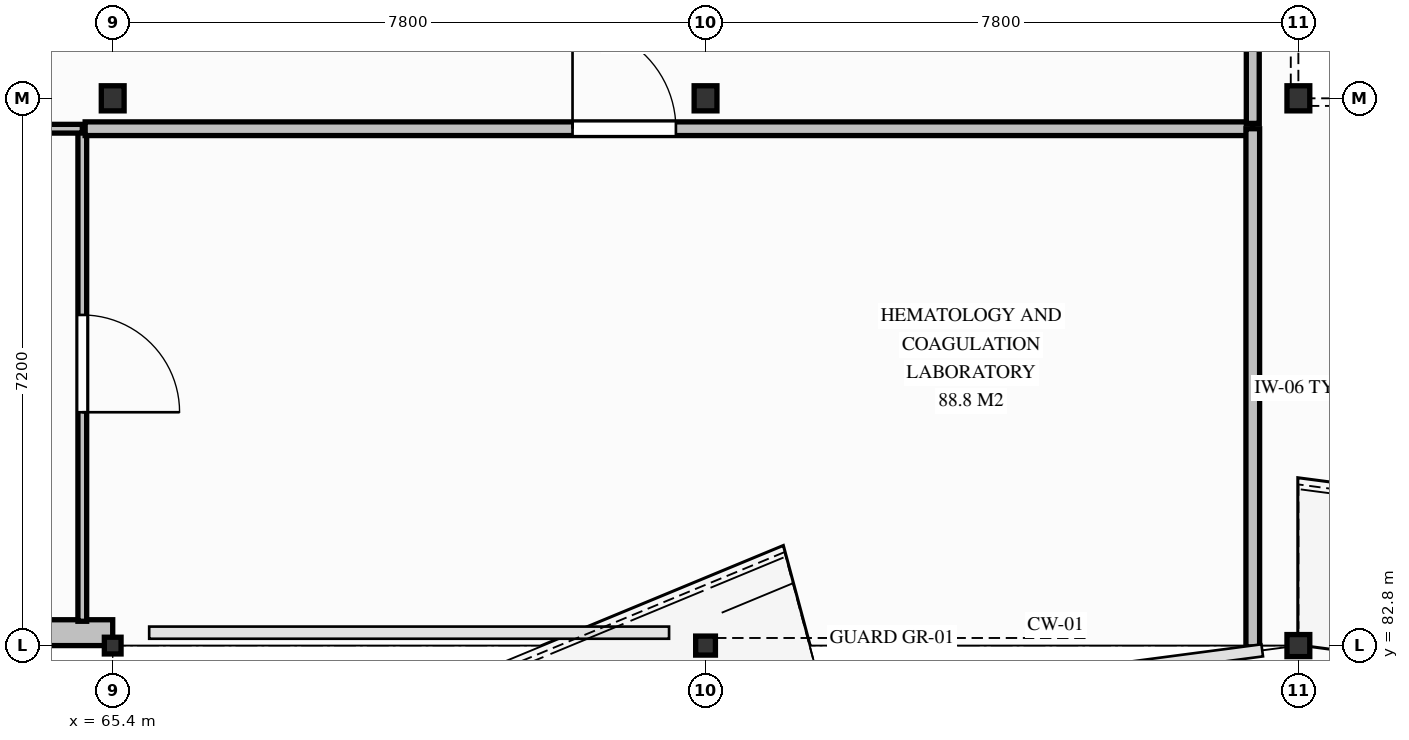
"""IFC4 building model, lengths in metres.
Left out: names, types, materials, properties, quantities, classifications, styles, units other than length and angle.
Written with IfcOpenShell. Run it as: python <this file> out.ifc"""

import sys

from ifc_helpers import new_model, si_unit, direction, frame, frame_2d, origin, origin_2d, place, context, subcontext, project, spatial, rectangle, hollow_rectangle, i_section, extrude, element, fill, save


model = new_model("IFC4")
c1 = context("Model", 3, precision=1e-05, world=origin(), true_north=direction((0.0, 1.0)))
c2 = subcontext(c1, "Body", "Model", "MODEL_VIEW")
j1 = project(units=[si_unit("LENGTHUNIT", "METRE"), si_unit("PLANEANGLEUNIT", "RADIAN")], contexts=[c1])
p1 = place(None, origin())
s1 = spatial("IfcSite", under=j1, at=p1, CompositionType="ELEMENT")
p2 = place(p1, origin())
s2 = spatial("IfcBuilding", under=s1, at=p2, CompositionType="ELEMENT")
p3 = place(p2, frame((0.0, 0.0, 13.2)))
s3 = spatial("IfcBuildingStorey", under=s2, at=p3, CompositionType="ELEMENT", Elevation=13.2)
p4 = place(p3, frame((65.4, 82.8, 0.0), z_axis=(0.0, 0.0, 1.0), x_axis=(1.0, 0.0, 0.0)))
e1 = element("IfcColumn", 1, at=p4, inside=s3, PredefinedType="COLUMN", context=c2, shape_type="SweptSolid", body=[
    extrude(hollow_rectangle(XDim=0.22, YDim=0.22, WallThickness=0.012, InnerFilletRadius=0.019, OuterFilletRadius=0.031, at=origin_2d()), origin(), (0.0, 0.0, 1.0), 4.05),
])
p5 = place(p3, frame((65.4, 90.0, 0.0), z_axis=(0.0, 0.0, 1.0), x_axis=(1.0, 0.0, 0.0)))
e2 = element("IfcColumn", 2, at=p5, inside=s3, PredefinedType="COLUMN", context=c2, shape_type="SweptSolid", body=[
    extrude(i_section(OverallWidth=0.3, OverallDepth=0.33, WebThickness=0.01, FlangeThickness=0.017, FilletRadius=0.027, at=origin_2d()), origin(), (0.0, 0.0, 1.0), 4.05),
])
p6 = place(p3, frame((73.2, 82.8, 0.0), z_axis=(0.0, 0.0, 1.0), x_axis=(1.0, 0.0, 0.0)))
e3 = element("IfcColumn", 3, at=p6, inside=s3, PredefinedType="COLUMN", context=c2, shape_type="SweptSolid", body=[
    extrude(i_section(OverallWidth=0.26, OverallDepth=0.25, WebThickness=0.008, FlangeThickness=0.012, FilletRadius=0.024, at=origin_2d()), origin(), (0.0, 0.0, 1.0), 4.05),
])
p7 = place(p3, frame((73.2, 90.0, 0.0), z_axis=(0.0, 0.0, 1.0), x_axis=(1.0, 0.0, 0.0)))
e4 = element("IfcColumn", 4, at=p7, inside=s3, PredefinedType="COLUMN", context=c2, shape_type="SweptSolid", body=[
    extrude(i_section(OverallWidth=0.3, OverallDepth=0.33, WebThickness=0.01, FlangeThickness=0.017, FilletRadius=0.027, at=origin_2d()), origin(), (0.0, 0.0, 1.0), 4.05),
])
p8 = place(p3, frame((81.0, 82.8, 0.0), z_axis=(0.0, 0.0, 1.0), x_axis=(1.0, 0.0, 0.0)))
e5 = element("IfcColumn", 5, at=p8, inside=s3, PredefinedType="COLUMN", context=c2, shape_type="SweptSolid", body=[
    extrude(i_section(OverallWidth=0.3, OverallDepth=0.29, WebThickness=0.009, FlangeThickness=0.014, FilletRadius=0.027, at=origin_2d()), origin(), (0.0, 0.0, 1.0), 4.05),
])
p9 = place(p3, frame((81.0, 90.0, 0.0), z_axis=(0.0, 0.0, 1.0), x_axis=(1.0, 0.0, 0.0)))
e6 = element("IfcColumn", 6, at=p9, inside=s3, PredefinedType="COLUMN", context=c2, shape_type="SweptSolid", body=[
    extrude(i_section(OverallWidth=0.3, OverallDepth=0.33, WebThickness=0.01, FlangeThickness=0.017, FilletRadius=0.027, at=origin_2d()), origin(), (0.0, 0.0, 1.0), 4.05),
])
p10 = place(p3, frame((65.4, 82.97, 0.0), z_axis=(0.0, 0.0, 1.0), x_axis=(-1.0, 0.0, 0.0)))
e7 = element("IfcWall", 7, at=p10, inside=s3, PredefinedType="SOLIDWALL", context=c2, shape_type="SweptSolid", body=[
    extrude(rectangle(XDim=8.4, YDim=0.34, at=frame_2d((4.2, 0.0))), origin(), (0.0, 0.0, 1.0), 3.318),
])
p11 = place(p10, frame((3.375, 0.0, 0.85)))
e8 = element("IfcOpeningElement", 8, at=p11, cuts=e7, PredefinedType="OPENING", context=c2, shape_type="SweptSolid", body=[
    extrude(rectangle(XDim=1.65, YDim=1.45, at=frame_2d((0.825, 0.725))), frame((0.0, 0.18, 0.0), z_axis=(0.0, -1.0, 0.0), x_axis=(1.0, 0.0, 0.0)), (0.0, 0.0, 1.0), 0.36),
])
p12 = place(p3, frame((65.0, 89.6, 0.0), z_axis=(0.0, 0.0, 1.0), x_axis=(0.0, -1.0, 0.0)))
e9 = element("IfcWall", 9, at=p12, inside=s3, PredefinedType="PARTITIONING", context=c2, shape_type="SweptSolid", body=[
    extrude(rectangle(XDim=6.48, YDim=0.115, at=frame_2d((3.24, 0.0))), origin(), (0.0, 0.0, 1.0), 3.78),
])
p13 = place(p12, frame((2.45, 0.0, 0.0)))
e10 = element("IfcOpeningElement", 10, at=p13, cuts=e9, PredefinedType="OPENING", context=c2, shape_type="SweptSolid", body=[
    extrude(rectangle(XDim=1.28, YDim=2.22, at=frame_2d((0.64, 1.11))), frame((0.0, 0.067, 0.0), z_axis=(0.0, -1.0, 0.0), x_axis=(1.0, 0.0, 0.0)), (0.0, 0.0, 1.0), 0.135),
])
p14 = place(p3, frame((49.52, 89.6, 0.0), z_axis=(0.0, 0.0, 1.0), x_axis=(1.0, 0.0, 0.0)))
e11 = element("IfcWall", 11, at=p14, inside=s3, PredefinedType="PARTITIONING", context=c2, shape_type="SweptSolid", body=[
    extrude(rectangle(XDim=15.48, YDim=0.115, at=frame_2d((7.74, 0.0))), origin(), (0.0, 0.0, 1.0), 3.488),
])
p15 = place(p3, frame((65.038, 89.6, 0.0), z_axis=(0.0, 0.0, 1.0), x_axis=(1.0, 0.0, 0.0)))
e12 = element("IfcWall", 12, at=p15, inside=s3, PredefinedType="PARTITIONING", context=c2, shape_type="SweptSolid", body=[
    extrude(rectangle(XDim=15.362, YDim=0.18, at=frame_2d((7.681, 0.0))), origin(), (0.0, 0.0, 1.0), 3.318),
])
p16 = place(p15, frame((6.413, 0.0, 0.0)))
e13 = element("IfcOpeningElement", 13, at=p16, cuts=e12, PredefinedType="OPENING", context=c2, shape_type="SweptSolid", body=[
    extrude(rectangle(XDim=1.36, YDim=2.2, at=frame_2d((0.68, 1.1))), frame((0.0, 0.1, 0.0), z_axis=(0.0, -1.0, 0.0), x_axis=(1.0, 0.0, 0.0)), (0.0, 0.0, 1.0), 0.2),
])
p17 = place(p3, frame((80.4, 89.6, 0.0), z_axis=(0.0, 0.0, 1.0), x_axis=(0.0, -1.0, 0.0)))
e14 = element("IfcWall", 14, at=p17, inside=s3, PredefinedType="PARTITIONING", context=c2, shape_type="SweptSolid", body=[
    extrude(rectangle(XDim=6.818, YDim=0.18, at=frame_2d((3.409, 0.0))), origin(), (0.0, 0.0, 1.0), 3.378),
])
p18 = place(p3, frame((80.4, 97.0, 0.0), z_axis=(0.0, 0.0, 1.0), x_axis=(0.0, -1.0, 0.0)))
e15 = element("IfcWall", 15, at=p18, inside=s3, PredefinedType="PARTITIONING", context=c2, shape_type="SweptSolid", body=[
    extrude(rectangle(XDim=7.33, YDim=0.17, at=frame_2d((3.665, 0.0))), origin(), (0.0, 0.0, 1.0), 3.518),
])
p19 = place(p13, origin())
e16 = element("IfcDoor", 16, at=p19, inside=s3, OperationType="SINGLE_SWING_RIGHT", PredefinedType="DOOR", context=c2, shape_type="SweptSolid", body=[
    extrude(rectangle(XDim=1.28, YDim=2.22, at=frame_2d((0.64, 1.11))), frame((0.0, 0.025, 0.0), z_axis=(0.0, -1.0, 0.0), x_axis=(1.0, 0.0, 0.0)), (0.0, 0.0, 1.0), 0.05),
])
fill(e10, e16)
p20 = place(p16, origin())
e17 = element("IfcDoor", 17, at=p20, inside=s3, OperationType="SINGLE_SWING_LEFT", PredefinedType="DOOR", context=c2, shape_type="SweptSolid", body=[
    extrude(rectangle(XDim=1.36, YDim=2.2, at=frame_2d((0.68, 1.1))), frame((0.0, 0.025, 0.0), z_axis=(0.0, -1.0, 0.0), x_axis=(1.0, 0.0, 0.0)), (0.0, 0.0, 1.0), 0.05),
])
fill(e13, e17)
save(model, sys.argv[1])
